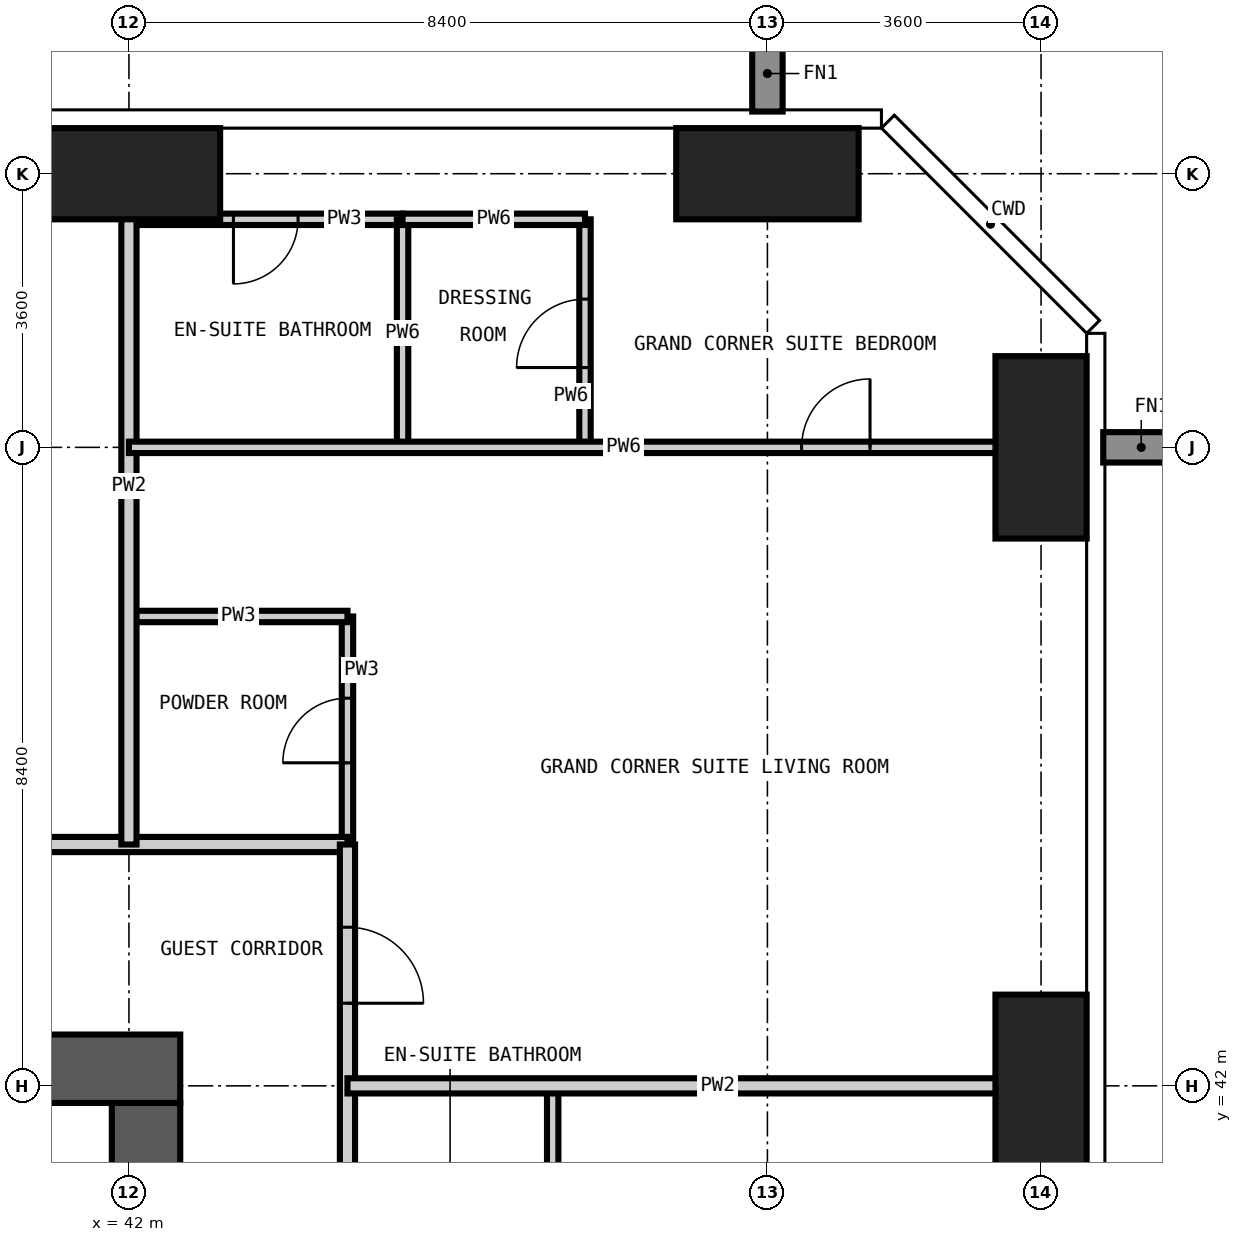
"""IFC4 building model, lengths in metres.
Left out: names, types, materials, properties, quantities, classifications, styles, units other than length and angle.
Written with IfcOpenShell. Run it as: python <this file> out.ifc"""

import sys

from ifc_helpers import new_model, si_unit, direction, frame, frame_2d, origin, origin_2d, place, context, subcontext, project, spatial, rectangle, extrude, element, fill, save


model = new_model("IFC4")
c1 = context("Model", 3, precision=1e-05, world=origin(), true_north=direction((0.0, 1.0)))
c2 = subcontext(c1, "Body", "Model", "MODEL_VIEW")
j1 = project(units=[si_unit("LENGTHUNIT", "METRE"), si_unit("PLANEANGLEUNIT", "RADIAN")], contexts=[c1])
p1 = place(None, origin())
s1 = spatial("IfcSite", under=j1, at=p1, CompositionType="ELEMENT")
p2 = place(p1, origin())
s2 = spatial("IfcBuilding", under=s1, at=p2, CompositionType="ELEMENT")
p3 = place(p2, frame((0.0, 0.0, 233.4)))
s3 = spatial("IfcBuildingStorey", under=s2, at=p3, CompositionType="ELEMENT", Elevation=233.4)
for number, where, z_axis, x_axis in (
    (1, (42.0, 54.0, -0.35), (0.0, 0.0, 1.0), (1.0, 0.0, 0.0)),
    (2, (50.4, 54.0, -0.35), (0.0, 0.0, 1.0), (1.0, 0.0, 0.0)),
):
    element("IfcColumn", number, at=place(p3, frame(where, z_axis=z_axis, x_axis=x_axis)), inside=s3, PredefinedType="COLUMN", context=c2, shape_type="SweptSolid", body=[
        extrude(rectangle(XDim=2.4, YDim=1.2, at=origin_2d()), origin(), (0.0, 0.0, 1.0), 3.9),
    ])
for number, where, z_axis, x_axis in (
    (3, (54.0, 42.0, -0.35), (0.0, 0.0, 1.0), (1.0, 0.0, 0.0)),
    (4, (54.0, 50.4, -0.35), (0.0, 0.0, 1.0), (1.0, 0.0, 0.0)),
):
    element("IfcColumn", number, at=place(p3, frame(where, z_axis=z_axis, x_axis=x_axis)), inside=s3, PredefinedType="COLUMN", context=c2, shape_type="SweptSolid", body=[
        extrude(rectangle(XDim=1.2, YDim=2.4, at=origin_2d()), origin(), (0.0, 0.0, 1.0), 3.9),
    ])
p4 = place(p3, frame((42.225, 17.025, -0.35), z_axis=(0.0, 0.0, 1.0), x_axis=(0.0, 1.0, 0.0)))
e5 = element("IfcWall", 5, at=p4, inside=s3, PredefinedType="SHEAR", context=c2, shape_type="SweptSolid", body=[
    extrude(rectangle(XDim=24.75, YDim=0.9, at=frame_2d((12.375, 0.0))), origin(), (0.0, 0.0, 1.0), 3.9),
])
p5 = place(p4, frame((0.575, 0.0, 0.35)))
e6 = element("IfcOpeningElement", 6, at=p5, cuts=e5, PredefinedType="OPENING", context=c2, shape_type="SweptSolid", body=[
    extrude(rectangle(XDim=1.2, YDim=2.2, at=frame_2d((0.6, 1.1))), frame((0.0, 0.46, 0.0), z_axis=(0.0, -1.0, 0.0), x_axis=(1.0, 0.0, 0.0)), (0.0, 0.0, 1.0), 0.92),
])
p6 = place(p4, frame((11.475, 0.0, 0.35)))
e7 = element("IfcOpeningElement", 7, at=p6, cuts=e5, PredefinedType="OPENING", context=c2, shape_type="SweptSolid", body=[
    extrude(rectangle(XDim=1.8, YDim=2.2, at=frame_2d((0.9, 1.1))), frame((0.0, 0.46, 0.0), z_axis=(0.0, -1.0, 0.0), x_axis=(1.0, 0.0, 0.0)), (0.0, 0.0, 1.0), 0.92),
])
p7 = place(p4, frame((20.275, 0.0, 0.35)))
e8 = element("IfcOpeningElement", 8, at=p7, cuts=e5, PredefinedType="OPENING", context=c2, shape_type="SweptSolid", body=[
    extrude(rectangle(XDim=1.0, YDim=2.1, at=frame_2d((0.5, 1.05))), frame((0.0, 0.46, 0.0), z_axis=(0.0, -1.0, 0.0), x_axis=(1.0, 0.0, 0.0)), (0.0, 0.0, 1.0), 0.92),
])
p8 = place(p3, frame((42.675, 42.225, -0.35), z_axis=(0.0, 0.0, 1.0), x_axis=(-1.0, 0.0, 0.0)))
e9 = element("IfcWall", 9, at=p8, inside=s3, PredefinedType="SHEAR", context=c2, shape_type="SweptSolid", body=[
    extrude(rectangle(XDim=18.15, YDim=0.9, at=frame_2d((9.075, 0.0))), origin(), (0.0, 0.0, 1.0), 3.9),
])
p9 = place(p8, frame((10.575, 0.0, 0.35)))
e10 = element("IfcOpeningElement", 10, at=p9, cuts=e9, PredefinedType="OPENING", context=c2, shape_type="SweptSolid", body=[
    extrude(rectangle(XDim=1.2, YDim=2.2, at=frame_2d((0.6, 1.1))), frame((0.0, 0.46, 0.0), z_axis=(0.0, -1.0, 0.0), x_axis=(1.0, 0.0, 0.0)), (0.0, 0.0, 1.0), 0.92),
])
p10 = place(p3, frame((44.875, 45.175, 0.0), z_axis=(0.0, 0.0, 1.0), x_axis=(0.0, 1.0, 0.0)))
e11 = element("IfcWall", 11, at=p10, inside=s3, PredefinedType="PARTITIONING", context=c2, shape_type="SweptSolid", body=[
    extrude(rectangle(XDim=3.0, YDim=0.15, at=frame_2d((1.5, 0.0))), origin(), (0.0, 0.0, 1.0), 3.55),
])
p11 = place(p10, frame((1.075, 0.0, 0.0)))
e12 = element("IfcOpeningElement", 12, at=p11, cuts=e11, PredefinedType="OPENING", context=c2, shape_type="SweptSolid", body=[
    extrude(rectangle(XDim=0.85, YDim=2.1, at=frame_2d((0.425, 1.05))), frame((0.0, 0.085, 0.0), z_axis=(0.0, -1.0, 0.0), x_axis=(1.0, 0.0, 0.0)), (0.0, 0.0, 1.0), 0.17),
])
p12 = place(p3, frame((47.575, 39.6, 0.0), z_axis=(0.0, 0.0, 1.0), x_axis=(0.0, 1.0, 0.0)))
e13 = element("IfcWall", 13, at=p12, inside=s3, PredefinedType="PARTITIONING", context=c2, shape_type="SweptSolid", body=[
    extrude(rectangle(XDim=2.4, YDim=0.15, at=frame_2d((1.2, 0.0))), origin(), (0.0, 0.0, 1.0), 3.55),
])
p13 = place(p3, frame((42.0, 48.175, 0.0), z_axis=(0.0, 0.0, 1.0), x_axis=(1.0, 0.0, 0.0)))
e14 = element("IfcWall", 14, at=p13, inside=s3, PredefinedType="PARTITIONING", context=c2, shape_type="SweptSolid", body=[
    extrude(rectangle(XDim=2.875, YDim=0.15, at=frame_2d((1.438, 0.0))), origin(), (0.0, 0.0, 1.0), 3.55),
])
p14 = place(p3, frame((42.0, 53.4, 0.0), z_axis=(0.0, 0.0, 1.0), x_axis=(1.0, 0.0, 0.0)))
e15 = element("IfcWall", 15, at=p14, inside=s3, PredefinedType="PARTITIONING", context=c2, shape_type="SweptSolid", body=[
    extrude(rectangle(XDim=3.6, YDim=0.15, at=frame_2d((1.8, 0.0))), origin(), (0.0, 0.0, 1.0), 3.55),
])
p15 = place(p14, frame((1.375, 0.0, 0.0)))
e16 = element("IfcOpeningElement", 16, at=p15, cuts=e15, PredefinedType="OPENING", context=c2, shape_type="SweptSolid", body=[
    extrude(rectangle(XDim=0.85, YDim=2.1, at=frame_2d((0.425, 1.05))), frame((0.0, 0.085, 0.0), z_axis=(0.0, -1.0, 0.0), x_axis=(1.0, 0.0, 0.0)), (0.0, 0.0, 1.0), 0.17),
])
p16 = place(p3, frame((22.625, 45.175, 0.0), z_axis=(0.0, 0.0, 1.0), x_axis=(1.0, 0.0, 0.0)))
e17 = element("IfcWall", 17, at=p16, inside=s3, PredefinedType="PARTITIONING", context=c2, shape_type="SweptSolid", body=[
    extrude(rectangle(XDim=22.25, YDim=0.2, at=frame_2d((11.125, 0.0))), origin(), (0.0, 0.0, 1.0), 3.55),
])
p17 = place(p16, frame((7.625, 0.0, 0.0)))
e18 = element("IfcOpeningElement", 18, at=p17, cuts=e17, PredefinedType="OPENING", context=c2, shape_type="SweptSolid", body=[
    extrude(rectangle(XDim=1.0, YDim=2.2, at=frame_2d((0.5, 1.1))), frame((0.0, 0.11, 0.0), z_axis=(0.0, -1.0, 0.0), x_axis=(1.0, 0.0, 0.0)), (0.0, 0.0, 1.0), 0.22),
])
p18 = place(p16, frame((16.025, 0.0, 0.0)))
e19 = element("IfcOpeningElement", 19, at=p18, cuts=e17, PredefinedType="OPENING", context=c2, shape_type="SweptSolid", body=[
    extrude(rectangle(XDim=1.0, YDim=2.2, at=frame_2d((0.5, 1.1))), frame((0.0, 0.11, 0.0), z_axis=(0.0, -1.0, 0.0), x_axis=(1.0, 0.0, 0.0)), (0.0, 0.0, 1.0), 0.22),
])
p19 = place(p3, frame((44.875, 45.175, 0.0), z_axis=(0.0, 0.0, 1.0), x_axis=(0.0, -1.0, 0.0)))
e20 = element("IfcWall", 20, at=p19, inside=s3, PredefinedType="PARTITIONING", context=c2, shape_type="SweptSolid", body=[
    extrude(rectangle(XDim=11.575, YDim=0.2, at=frame_2d((5.788, 0.0))), origin(), (0.0, 0.0, 1.0), 3.55),
])
p20 = place(p19, frame((7.775, 0.0, 0.0)))
e21 = element("IfcOpeningElement", 21, at=p20, cuts=e20, PredefinedType="OPENING", context=c2, shape_type="SweptSolid", body=[
    extrude(rectangle(XDim=1.0, YDim=2.2, at=frame_2d((0.5, 1.1))), frame((0.0, 0.11, 0.0), z_axis=(0.0, -1.0, 0.0), x_axis=(1.0, 0.0, 0.0)), (0.0, 0.0, 1.0), 0.22),
])
p21 = place(p19, frame((5.975, 0.0, 0.0)))
e22 = element("IfcOpeningElement", 22, at=p21, cuts=e20, PredefinedType="OPENING", context=c2, shape_type="SweptSolid", body=[
    extrude(rectangle(XDim=1.0, YDim=2.2, at=frame_2d((0.5, 1.1))), frame((0.0, 0.11, 0.0), z_axis=(0.0, -1.0, 0.0), x_axis=(1.0, 0.0, 0.0)), (0.0, 0.0, 1.0), 0.22),
])
p22 = place(p19, frame((1.088, 0.0, 0.0)))
e23 = element("IfcOpeningElement", 23, at=p22, cuts=e20, PredefinedType="OPENING", context=c2, shape_type="SweptSolid", body=[
    extrude(rectangle(XDim=1.0, YDim=2.2, at=frame_2d((0.5, 1.1))), frame((0.0, 0.11, 0.0), z_axis=(0.0, -1.0, 0.0), x_axis=(1.0, 0.0, 0.0)), (0.0, 0.0, 1.0), 0.22),
])
p23 = place(p3, frame((42.0, 45.175, 0.0), z_axis=(0.0, 0.0, 1.0), x_axis=(0.0, 1.0, 0.0)))
e24 = element("IfcWall", 24, at=p23, inside=s3, PredefinedType="PARTITIONING", context=c2, shape_type="SweptSolid", body=[
    extrude(rectangle(XDim=9.443, YDim=0.2, at=frame_2d((4.721, 0.0))), origin(), (0.0, 0.0, 1.0), 3.55),
])
p24 = place(p3, frame((44.875, 42.0, 0.0), z_axis=(0.0, 0.0, 1.0), x_axis=(1.0, 0.0, 0.0)))
e25 = element("IfcWall", 25, at=p24, inside=s3, PredefinedType="PARTITIONING", context=c2, shape_type="SweptSolid", body=[
    extrude(rectangle(XDim=9.743, YDim=0.2, at=frame_2d((4.872, 0.0))), origin(), (0.0, 0.0, 1.0), 3.55),
])
p25 = place(p3, frame((45.6, 50.4, 0.0), z_axis=(0.0, 0.0, 1.0), x_axis=(0.0, 1.0, 0.0)))
e26 = element("IfcWall", 26, at=p25, inside=s3, PredefinedType="PARTITIONING", context=c2, shape_type="SweptSolid", body=[
    extrude(rectangle(XDim=3.0, YDim=0.15, at=frame_2d((1.5, 0.0))), origin(), (0.0, 0.0, 1.0), 3.55),
])
p26 = place(p3, frame((48.0, 50.4, 0.0), z_axis=(0.0, 0.0, 1.0), x_axis=(0.0, 1.0, 0.0)))
e27 = element("IfcWall", 27, at=p26, inside=s3, PredefinedType="PARTITIONING", context=c2, shape_type="SweptSolid", body=[
    extrude(rectangle(XDim=3.0, YDim=0.15, at=frame_2d((1.5, 0.0))), origin(), (0.0, 0.0, 1.0), 3.55),
])
p27 = place(p26, frame((1.05, 0.0, 0.0)))
e28 = element("IfcOpeningElement", 28, at=p27, cuts=e27, PredefinedType="OPENING", context=c2, shape_type="SweptSolid", body=[
    extrude(rectangle(XDim=0.9, YDim=2.1, at=frame_2d((0.45, 1.05))), frame((0.0, 0.085, 0.0), z_axis=(0.0, -1.0, 0.0), x_axis=(1.0, 0.0, 0.0)), (0.0, 0.0, 1.0), 0.17),
])
p28 = place(p3, frame((42.0, 50.4, 0.0), z_axis=(0.0, 0.0, 1.0), x_axis=(1.0, 0.0, 0.0)))
e29 = element("IfcWall", 29, at=p28, inside=s3, PredefinedType="PARTITIONING", context=c2, shape_type="SweptSolid", body=[
    extrude(rectangle(XDim=12.618, YDim=0.15, at=frame_2d((6.309, 0.0))), origin(), (0.0, 0.0, 1.0), 3.55),
])
p29 = place(p28, frame((8.85, 0.0, 0.0)))
e30 = element("IfcOpeningElement", 30, at=p29, cuts=e29, PredefinedType="OPENING", context=c2, shape_type="SweptSolid", body=[
    extrude(rectangle(XDim=0.9, YDim=2.1, at=frame_2d((0.45, 1.05))), frame((0.0, 0.085, 0.0), z_axis=(0.0, -1.0, 0.0), x_axis=(1.0, 0.0, 0.0)), (0.0, 0.0, 1.0), 0.17),
])
p30 = place(p3, frame((45.6, 53.4, 0.0), z_axis=(0.0, 0.0, 1.0), x_axis=(1.0, 0.0, 0.0)))
e31 = element("IfcWall", 31, at=p30, inside=s3, PredefinedType="PARTITIONING", context=c2, shape_type="SweptSolid", body=[
    extrude(rectangle(XDim=2.4, YDim=0.15, at=frame_2d((1.2, 0.0))), origin(), (0.0, 0.0, 1.0), 3.55),
])
p31 = place(p22, origin())
e32 = element("IfcDoor", 32, at=p31, inside=s3, OperationType="SINGLE_SWING_RIGHT", PredefinedType="DOOR", context=c2, shape_type="SweptSolid", body=[
    extrude(rectangle(XDim=1.0, YDim=2.2, at=frame_2d((0.5, 1.1))), frame((0.0, 0.025, 0.0), z_axis=(0.0, -1.0, 0.0), x_axis=(1.0, 0.0, 0.0)), (0.0, 0.0, 1.0), 0.05),
])
fill(e23, e32)
p32 = place(p11, origin())
e33 = element("IfcDoor", 33, at=p32, inside=s3, OperationType="SINGLE_SWING_LEFT", PredefinedType="DOOR", context=c2, shape_type="SweptSolid", body=[
    extrude(rectangle(XDim=0.85, YDim=2.1, at=frame_2d((0.425, 1.05))), frame((0.0, 0.025, 0.0), z_axis=(0.0, -1.0, 0.0), x_axis=(1.0, 0.0, 0.0)), (0.0, 0.0, 1.0), 0.05),
])
fill(e12, e33)
p33 = place(p29, origin())
e34 = element("IfcDoor", 34, at=p33, inside=s3, OperationType="SINGLE_SWING_RIGHT", PredefinedType="DOOR", context=c2, shape_type="SweptSolid", body=[
    extrude(rectangle(XDim=0.9, YDim=2.1, at=frame_2d((0.45, 1.05))), frame((0.0, 0.025, 0.0), z_axis=(0.0, -1.0, 0.0), x_axis=(1.0, 0.0, 0.0)), (0.0, 0.0, 1.0), 0.05),
])
fill(e30, e34)
p34 = place(p15, frame((0.85, 0.0, 0.0), z_axis=(0.0, 0.0, 1.0), x_axis=(-1.0, 0.0, 0.0)))
e35 = element("IfcDoor", 35, at=p34, inside=s3, OperationType="SINGLE_SWING_RIGHT", PredefinedType="DOOR", context=c2, shape_type="SweptSolid", body=[
    extrude(rectangle(XDim=0.85, YDim=2.1, at=frame_2d((0.425, 1.05))), frame((0.0, 0.025, 0.0), z_axis=(0.0, -1.0, 0.0), x_axis=(1.0, 0.0, 0.0)), (0.0, 0.0, 1.0), 0.05),
])
fill(e16, e35)
p35 = place(p27, origin())
e36 = element("IfcDoor", 36, at=p35, inside=s3, OperationType="SINGLE_SWING_LEFT", PredefinedType="DOOR", context=c2, shape_type="SweptSolid", body=[
    extrude(rectangle(XDim=0.9, YDim=2.1, at=frame_2d((0.45, 1.05))), frame((0.0, 0.025, 0.0), z_axis=(0.0, -1.0, 0.0), x_axis=(1.0, 0.0, 0.0)), (0.0, 0.0, 1.0), 0.05),
])
fill(e28, e36)
save(model, sys.argv[1])
